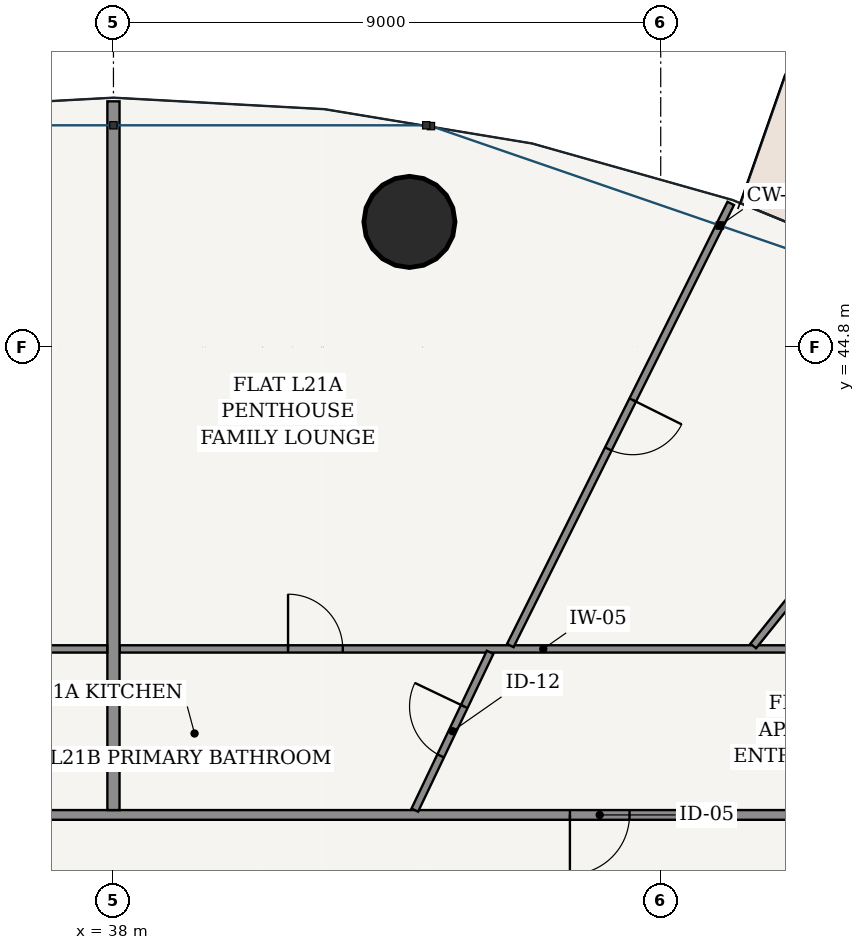
"""IFC4 building model, lengths in metres.
Left out: names, types, materials, properties, quantities, classifications, styles, units other than length and angle.
Written with IfcOpenShell. Run it as: python <this file> out.ifc"""

import sys

from ifc_helpers import new_model, si_unit, direction, frame, frame_2d, origin, origin_2d, place, context, subcontext, project, spatial, rectangle, hollow_circle, extrude, source, transform, mapped, element, fill, save


model = new_model("IFC4")
c1 = context("Model", 3, precision=1e-05, world=origin(), true_north=direction((-0.2419218956, 0.970295726276)))
c2 = subcontext(c1, "Body", "Model", "MODEL_VIEW")
j1 = project(units=[si_unit("LENGTHUNIT", "METRE"), si_unit("PLANEANGLEUNIT", "RADIAN")], contexts=[c1])
p1 = place(None, origin())
s1 = spatial("IfcSite", under=j1, at=p1, CompositionType="ELEMENT")
p2 = place(p1, origin())
s2 = spatial("IfcBuilding", under=s1, at=p2, CompositionType="ELEMENT")
p3 = place(p2, frame((0.0, 0.0, 83.4)))
s3 = spatial("IfcBuildingStorey", under=s2, at=p3, CompositionType="ELEMENT", Elevation=83.4)
p4 = place(p3, frame((42.867, 46.857, 0.0), z_axis=(0.0, 0.0, 1.0), x_axis=(1.0, 0.0, 0.0)))
e1 = element("IfcColumn", 1, at=p4, inside=s3, PredefinedType="COLUMN", context=c2, shape_type="SweptSolid", body=[
    extrude(hollow_circle(Radius=0.75, WallThickness=0.045, at=origin_2d()), origin(), (0.0, 0.0, 1.0), 3.6),
])
p5 = place(p3, frame((26.695, 37.105, 0.0), z_axis=(0.0, 0.0, 1.0), x_axis=(1.0, 0.0, 0.0)))
e2 = element("IfcWall", 2, at=p5, inside=s3, PredefinedType="PARTITIONING", context=c2, shape_type="SweptSolid", body=[
    extrude(rectangle(XDim=22.61, YDim=0.16, at=frame_2d((11.305, 0.0))), origin(), (0.0, 0.0, 1.0), 2.767),
])
p6 = place(p5, frame((18.812, 0.0, 0.0)))
e3 = element("IfcOpeningElement", 3, at=p6, cuts=e2, PredefinedType="OPENING", context=c2, shape_type="SweptSolid", body=[
    extrude(rectangle(XDim=0.98, YDim=2.2, at=frame_2d((0.49, 1.1))), frame((0.0, 0.09, 0.0), z_axis=(0.0, -1.0, 0.0), x_axis=(1.0, 0.0, 0.0)), (0.0, 0.0, 1.0), 0.18),
])
p7 = place(p5, frame((2.823, 0.0, 0.0)))
e4 = element("IfcOpeningElement", 4, at=p7, cuts=e2, PredefinedType="OPENING", context=c2, shape_type="SweptSolid", body=[
    extrude(rectangle(XDim=0.98, YDim=2.2, at=frame_2d((0.49, 1.1))), frame((0.0, 0.09, 0.0), z_axis=(0.0, -1.0, 0.0), x_axis=(1.0, 0.0, 0.0)), (0.0, 0.0, 1.0), 0.18),
])
p8 = place(p3, frame((38.102, 39.835, 0.0), z_axis=(0.0, 0.0, 1.0), x_axis=(1.0, 0.0, 0.0)))
e5 = element("IfcWall", 5, at=p8, inside=s3, PredefinedType="PARTITIONING", context=c2, shape_type="SweptSolid", body=[
    extrude(rectangle(XDim=13.933, YDim=0.12, at=frame_2d((6.966, 0.0))), origin(), (0.0, 0.0, 1.0), 2.767),
])
p9 = place(p8, frame((2.769, 0.0, 0.0)))
e6 = element("IfcOpeningElement", 6, at=p9, cuts=e5, PredefinedType="OPENING", context=c2, shape_type="SweptSolid", body=[
    extrude(rectangle(XDim=0.9, YDim=2.15, at=frame_2d((0.45, 1.075))), frame((0.0, 0.07, 0.0), z_axis=(0.0, -1.0, 0.0), x_axis=(1.0, 0.0, 0.0)), (0.0, 0.0, 1.0), 0.14),
])
p10 = place(p3, frame((48.522, 39.883, 0.0), z_axis=(0.0, 0.0, 1.0), x_axis=(0.62672583251, 0.779239841682, 0.0)))
e7 = element("IfcWall", 7, at=p10, inside=s3, PredefinedType="PARTITIONING", context=c2, shape_type="SweptSolid", body=[
    extrude(rectangle(XDim=6.678, YDim=0.12, at=frame_2d((3.339, 0.0))), origin(), (0.0, 0.0, 1.0), 2.767),
])
p11 = place(p3, frame((44.526, 39.89, 0.0), z_axis=(0.0, 0.0, 1.0), x_axis=(0.446167584581, 0.894949432353, 0.0)))
e8 = element("IfcWall", 8, at=p11, inside=s3, PredefinedType="PARTITIONING", context=c2, shape_type="SweptSolid", body=[
    extrude(rectangle(XDim=8.125, YDim=0.12, at=frame_2d((4.062, 0.0))), origin(), (0.0, 0.0, 1.0), 2.767),
])
p12 = place(p11, frame((3.612, 0.0, 0.0)))
e9 = element("IfcOpeningElement", 9, at=p12, cuts=e8, PredefinedType="OPENING", context=c2, shape_type="SweptSolid", body=[
    extrude(rectangle(XDim=0.9, YDim=2.15, at=frame_2d((0.45, 1.075))), frame((0.0, 0.07, 0.0), z_axis=(0.0, -1.0, 0.0), x_axis=(1.0, 0.0, 0.0)), (0.0, 0.0, 1.0), 0.14),
])
p13 = place(p3, frame((42.956, 37.185, 0.0), z_axis=(0.0, 0.0, 1.0), x_axis=(0.430728013923, 0.902481788194, 0.0)))
e10 = element("IfcWall", 10, at=p13, inside=s3, PredefinedType="PARTITIONING", context=c2, shape_type="SweptSolid", body=[
    extrude(rectangle(XDim=2.874, YDim=0.12, at=frame_2d((1.437, 0.0))), origin(), (0.0, 0.0, 1.0), 3.325),
])
p14 = place(p13, frame((0.987, 0.0, 0.0)))
e11 = element("IfcOpeningElement", 11, at=p14, cuts=e10, PredefinedType="OPENING", context=c2, shape_type="SweptSolid", body=[
    extrude(rectangle(XDim=0.9, YDim=2.15, at=frame_2d((0.45, 1.075))), frame((0.0, 0.07, 0.0), z_axis=(0.0, -1.0, 0.0), x_axis=(1.0, 0.0, 0.0)), (0.0, 0.0, 1.0), 0.14),
])
p15 = place(p3, frame((38.0, 37.185, 0.0), z_axis=(0.0, 0.0, 1.0), x_axis=(0.0, 1.0, 0.0)))
e12 = element("IfcWall", 12, at=p15, inside=s3, PredefinedType="PARTITIONING", context=c2, shape_type="SweptSolid", body=[
    extrude(rectangle(XDim=11.655, YDim=0.2, at=frame_2d((5.828, 0.0))), origin(), (0.0, 0.0, 1.0), 2.767),
])
p16 = place(p3, frame((23.965, 39.835, 0.0), z_axis=(0.0, 0.0, 1.0), x_axis=(1.0, 0.0, 0.0)))
e13 = element("IfcWall", 13, at=p16, inside=s3, PredefinedType="PARTITIONING", context=c2, shape_type="SweptSolid", body=[
    extrude(rectangle(XDim=13.933, YDim=0.12, at=frame_2d((6.966, 0.0))), origin(), (0.0, 0.0, 1.0), 2.767),
])
p17 = place(p16, frame((3.636, 0.0, 0.0)))
e14 = element("IfcOpeningElement", 14, at=p17, cuts=e13, PredefinedType="OPENING", context=c2, shape_type="SweptSolid", body=[
    extrude(rectangle(XDim=0.9, YDim=2.15, at=frame_2d((0.45, 1.075))), frame((0.0, 0.07, 0.0), z_axis=(0.0, -1.0, 0.0), x_axis=(1.0, 0.0, 0.0)), (0.0, 0.0, 1.0), 0.14),
])
m1 = source(origin(), c2, "Body", "SweptSolid", [
    extrude(rectangle(XDim=0.98, YDim=2.2, at=frame_2d((0.49, 1.1))), frame((0.0, 0.025, 0.0), z_axis=(0.0, -1.0, 0.0), x_axis=(1.0, 0.0, 0.0)), (0.0, 0.0, 1.0), 0.05),
])
p18 = place(p6, frame((0.98, 0.0, 0.0), z_axis=(0.0, 0.0, 1.0), x_axis=(-1.0, 0.0, 0.0)))
e15 = element("IfcDoor", 15, at=p18, inside=s3, OperationType="SINGLE_SWING_RIGHT", PredefinedType="DOOR", context=c2, shape_type="MappedRepresentation", body=[
    mapped(m1, transform((0.0, 0.0, 0.0), scale=1.0)),
])
fill(e3, e15)
m2 = source(origin(), c2, "Body", "SweptSolid", [
    extrude(rectangle(XDim=0.9, YDim=2.15, at=frame_2d((0.45, 1.075))), frame((0.0, 0.025, 0.0), z_axis=(0.0, -1.0, 0.0), x_axis=(1.0, 0.0, 0.0)), (0.0, 0.0, 1.0), 0.05),
])
p19 = place(p14, origin())
e16 = element("IfcDoor", 16, at=p19, inside=s3, OperationType="SINGLE_SWING_RIGHT", PredefinedType="DOOR", context=c2, shape_type="MappedRepresentation", body=[
    mapped(m2, transform((0.0, 0.0, 0.0), scale=1.0)),
])
fill(e11, e16)
p20 = place(p9, origin())
e17 = element("IfcDoor", 17, at=p20, inside=s3, OperationType="SINGLE_SWING_LEFT", PredefinedType="DOOR", context=c2, shape_type="MappedRepresentation", body=[
    mapped(m2, transform((0.0, 0.0, 0.0), scale=1.0)),
])
fill(e6, e17)
p21 = place(p12, frame((0.9, 0.0, 0.0), z_axis=(0.0, 0.0, 1.0), x_axis=(-1.0, 0.0, 0.0)))
e18 = element("IfcDoor", 18, at=p21, inside=s3, OperationType="SINGLE_SWING_LEFT", PredefinedType="DOOR", context=c2, shape_type="MappedRepresentation", body=[
    mapped(m2, transform((0.0, 0.0, 0.0), scale=1.0)),
])
fill(e9, e18)
save(model, sys.argv[1])
